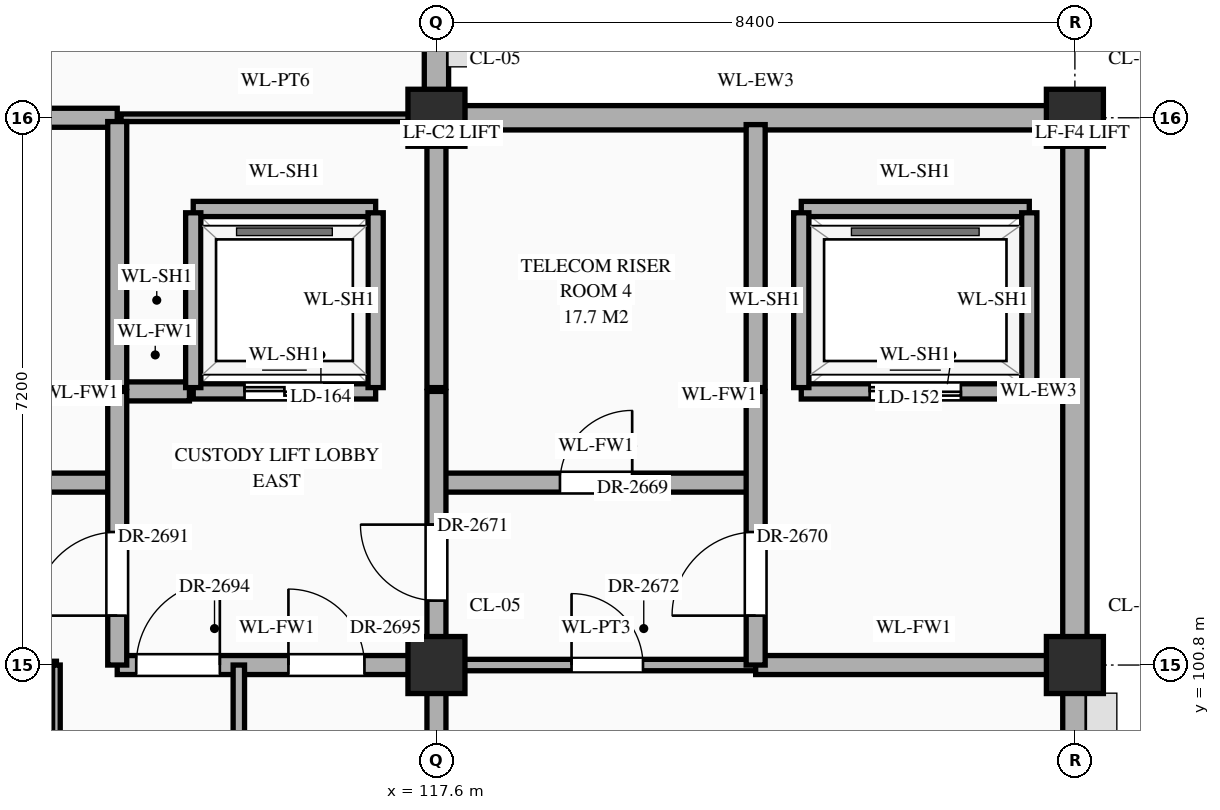
"""IFC4 building model, lengths in metres.
Left out: names, types, materials, properties, quantities, classifications, styles, units other than length and angle.
Written with IfcOpenShell. Run it as: python <this file> out.ifc"""

import sys

from ifc_helpers import new_model, si_unit, direction, frame, frame_2d, origin, origin_2d, place, context, subcontext, project, spatial, rectangle, extrude, element, fill, save


model = new_model("IFC4")
c1 = context("Model", 3, precision=1e-05, world=origin(), true_north=direction((0.0, 1.0)))
c2 = subcontext(c1, "Body", "Model", "MODEL_VIEW")
j1 = project(units=[si_unit("LENGTHUNIT", "METRE"), si_unit("PLANEANGLEUNIT", "RADIAN")], contexts=[c1])
p1 = place(None, origin())
s1 = spatial("IfcSite", under=j1, at=p1, CompositionType="ELEMENT")
p2 = place(p1, origin())
s2 = spatial("IfcBuilding", under=s1, at=p2, CompositionType="ELEMENT")
p3 = place(p2, frame((0.0, 0.0, 39.3)))
s3 = spatial("IfcBuildingStorey", under=s2, at=p3, CompositionType="ELEMENT", Elevation=39.3)
for number, where, z_axis, x_axis in (
    (1, (117.6, 100.8, 0.0), (0.0, 0.0, 1.0), (1.0, 0.0, 0.0)),
    (2, (117.6, 108.0, 0.0), (0.0, 0.0, 1.0), (1.0, 0.0, 0.0)),
    (3, (126.0, 100.8, 0.0), (0.0, 0.0, 1.0), (1.0, 0.0, 0.0)),
    (4, (126.0, 108.0, 0.0), (0.0, 0.0, 1.0), (1.0, 0.0, 0.0)),
):
    element("IfcColumn", number, at=place(p3, frame(where, z_axis=z_axis, x_axis=x_axis)), inside=s3, PredefinedType="COLUMN", context=c2, shape_type="SweptSolid", body=[
        extrude(rectangle(XDim=0.75, YDim=0.75, at=origin_2d()), origin(), (0.0, 0.0, 1.0), 4.2),
    ])
p4 = place(p3, frame((117.6, 108.37, 0.0), z_axis=(0.0, 0.0, 1.0), x_axis=(0.0, 1.0, 0.0)))
e5 = element("IfcWall", 5, at=p4, inside=s3, PredefinedType="STANDARD", context=c2, shape_type="SweptSolid", body=[
    extrude(rectangle(XDim=6.46, YDim=0.32, at=frame_2d((3.23, 0.0))), origin(), (0.0, 0.0, 1.0), 3.3),
])
p5 = place(p4, frame((3.93, 0.0, 0.85)))
e6 = element("IfcOpeningElement", 6, at=p5, cuts=e5, PredefinedType="OPENING", context=c2, shape_type="SweptSolid", body=[
    extrude(rectangle(XDim=1.2, YDim=1.56, at=frame_2d((0.6, 0.78))), frame((0.0, 0.172, 0.0), z_axis=(0.0, -1.0, 0.0), x_axis=(1.0, 0.0, 0.0)), (0.0, 0.0, 1.0), 0.344),
])
p6 = place(p3, frame((126.0, 93.97, 0.0), z_axis=(0.0, 0.0, 1.0), x_axis=(0.0, 1.0, 0.0)))
e7 = element("IfcWall", 7, at=p6, inside=s3, PredefinedType="STANDARD", context=c2, shape_type="SweptSolid", body=[
    extrude(rectangle(XDim=6.46, YDim=0.32, at=frame_2d((3.23, 0.0))), origin(), (0.0, 0.0, 1.0), 3.3),
])
p7 = place(p6, frame((3.93, 0.0, 0.85)))
e8 = element("IfcOpeningElement", 8, at=p7, cuts=e7, PredefinedType="OPENING", context=c2, shape_type="SweptSolid", body=[
    extrude(rectangle(XDim=1.2, YDim=1.38, at=frame_2d((0.6, 0.69))), frame((0.0, 0.172, 0.0), z_axis=(0.0, -1.0, 0.0), x_axis=(1.0, 0.0, 0.0)), (0.0, 0.0, 1.0), 0.344),
])
p8 = place(p3, frame((117.97, 108.0, 0.0), z_axis=(0.0, 0.0, 1.0), x_axis=(1.0, 0.0, 0.0)))
e9 = element("IfcWall", 9, at=p8, inside=s3, PredefinedType="STANDARD", context=c2, shape_type="SweptSolid", body=[
    extrude(rectangle(XDim=7.66, YDim=0.32, at=frame_2d((3.83, 0.0))), origin(), (0.0, 0.0, 1.0), 3.3),
])
p9 = place(p3, frame((126.0, 101.17, 0.0), z_axis=(0.0, 0.0, 1.0), x_axis=(0.0, 1.0, 0.0)))
e10 = element("IfcWall", 10, at=p9, inside=s3, PredefinedType="STANDARD", context=c2, shape_type="SweptSolid", body=[
    extrude(rectangle(XDim=6.46, YDim=0.32, at=frame_2d((3.23, 0.0))), origin(), (0.0, 0.0, 1.0), 3.3),
])
p10 = place(p3, frame((109.2, 100.8, 0.0), z_axis=(0.0, 0.0, 1.0), x_axis=(1.0, 0.0, 0.0)))
e11 = element("IfcWall", 11, at=p10, inside=s3, PredefinedType="STANDARD", context=c2, shape_type="SweptSolid", body=[
    extrude(rectangle(XDim=3.4, YDim=0.1, at=frame_2d((1.7, 0.0))), origin(), (0.0, 0.0, 1.0), 3.1),
])
p11 = place(p10, frame((1.317, 0.0, 0.0)))
e12 = element("IfcOpeningElement", 12, at=p11, cuts=e11, PredefinedType="OPENING", context=c2, shape_type="SweptSolid", body=[
    extrude(rectangle(XDim=1.06, YDim=2.4, at=frame_2d((0.53, 1.2))), frame((0.0, 0.062, 0.0), z_axis=(0.0, -1.0, 0.0), x_axis=(1.0, 0.0, 0.0)), (0.0, 0.0, 1.0), 0.124),
])
p12 = place(p3, frame((113.4, 100.8, 0.0), z_axis=(0.0, 0.0, 1.0), x_axis=(1.0, 0.0, 0.0)))
e13 = element("IfcWall", 13, at=p12, inside=s3, PredefinedType="STANDARD", context=c2, shape_type="SweptSolid", body=[
    extrude(rectangle(XDim=4.2, YDim=0.25, at=frame_2d((2.1, 0.0))), origin(), (0.0, 0.0, 1.0), 3.1),
])
p13 = place(p12, frame((0.25, 0.0, 0.0)))
e14 = element("IfcOpeningElement", 14, at=p13, cuts=e13, PredefinedType="OPENING", context=c2, shape_type="SweptSolid", body=[
    extrude(rectangle(XDim=1.1, YDim=2.2, at=frame_2d((0.55, 1.1))), frame((0.0, 0.137, 0.0), z_axis=(0.0, -1.0, 0.0), x_axis=(1.0, 0.0, 0.0)), (0.0, 0.0, 1.0), 0.274),
])
p14 = place(p12, frame((2.252, 0.0, 0.0)))
e15 = element("IfcOpeningElement", 15, at=p14, cuts=e13, PredefinedType="OPENING", context=c2, shape_type="SweptSolid", body=[
    extrude(rectangle(XDim=1.0, YDim=2.2, at=frame_2d((0.5, 1.1))), frame((0.0, 0.137, 0.0), z_axis=(0.0, -1.0, 0.0), x_axis=(1.0, 0.0, 0.0)), (0.0, 0.0, 1.0), 0.274),
])
p15 = place(p3, frame((117.6, 100.8, 0.0), z_axis=(0.0, 0.0, 1.0), x_axis=(1.0, 0.0, 0.0)))
e16 = element("IfcWall", 16, at=p15, inside=s3, PredefinedType="STANDARD", context=c2, shape_type="SweptSolid", body=[
    extrude(rectangle(XDim=4.2, YDim=0.15, at=frame_2d((2.1, 0.0))), origin(), (0.0, 0.0, 1.0), 3.1),
])
p16 = place(p15, frame((1.778, 0.0, 0.0)))
e17 = element("IfcOpeningElement", 17, at=p16, cuts=e16, PredefinedType="OPENING", context=c2, shape_type="SweptSolid", body=[
    extrude(rectangle(XDim=0.94, YDim=2.3, at=frame_2d((0.47, 1.15))), frame((0.0, 0.087, 0.0), z_axis=(0.0, -1.0, 0.0), x_axis=(1.0, 0.0, 0.0)), (0.0, 0.0, 1.0), 0.174),
])
p17 = place(p3, frame((121.8, 100.8, 0.0), z_axis=(0.0, 0.0, 1.0), x_axis=(1.0, 0.0, 0.0)))
e18 = element("IfcWall", 18, at=p17, inside=s3, PredefinedType="STANDARD", context=c2, shape_type="SweptSolid", body=[
    extrude(rectangle(XDim=4.16, YDim=0.25, at=frame_2d((2.08, 0.0))), origin(), (0.0, 0.0, 1.0), 3.1),
])
p18 = place(p3, frame((109.2, 103.2, 0.0), z_axis=(0.0, 0.0, 1.0), x_axis=(1.0, 0.0, 0.0)))
e19 = element("IfcWall", 19, at=p18, inside=s3, PredefinedType="STANDARD", context=c2, shape_type="SweptSolid", body=[
    extrude(rectangle(XDim=4.2, YDim=0.25, at=frame_2d((2.1, 0.0))), origin(), (0.0, 0.0, 1.0), 3.95),
])
p19 = place(p18, frame((1.625, 0.0, 0.0)))
e20 = element("IfcOpeningElement", 20, at=p19, cuts=e19, PredefinedType="OPENING", context=c2, shape_type="SweptSolid", body=[
    extrude(rectangle(XDim=0.95, YDim=2.15, at=frame_2d((0.475, 1.075))), frame((0.0, 0.137, 0.0), z_axis=(0.0, -1.0, 0.0), x_axis=(1.0, 0.0, 0.0)), (0.0, 0.0, 1.0), 0.274),
])
p20 = place(p3, frame((117.6, 103.2, 0.0), z_axis=(0.0, 0.0, 1.0), x_axis=(1.0, 0.0, 0.0)))
e21 = element("IfcWall", 21, at=p20, inside=s3, PredefinedType="STANDARD", context=c2, shape_type="SweptSolid", body=[
    extrude(rectangle(XDim=4.2, YDim=0.25, at=frame_2d((2.1, 0.0))), origin(), (0.0, 0.0, 1.0), 3.95),
])
p21 = place(p20, frame((1.625, 0.0, 0.0)))
e22 = element("IfcOpeningElement", 22, at=p21, cuts=e21, PredefinedType="OPENING", context=c2, shape_type="SweptSolid", body=[
    extrude(rectangle(XDim=0.95, YDim=2.15, at=frame_2d((0.475, 1.075))), frame((0.0, 0.137, 0.0), z_axis=(0.0, -1.0, 0.0), x_axis=(1.0, 0.0, 0.0)), (0.0, 0.0, 1.0), 0.274),
])
p22 = place(p3, frame((113.45, 104.4, 0.0), z_axis=(0.0, 0.0, 1.0), x_axis=(1.0, 0.0, 0.0)))
e23 = element("IfcWall", 23, at=p22, inside=s3, PredefinedType="STANDARD", context=c2, shape_type="SweptSolid", body=[
    extrude(rectangle(XDim=0.9, YDim=0.25, at=frame_2d((0.45, 0.0))), origin(), (0.0, 0.0, 1.0), 3.95),
])
p23 = place(p3, frame((114.4, 104.4, 0.0), z_axis=(0.0, 0.0, 1.0), x_axis=(1.0, 0.0, 0.0)))
e24 = element("IfcWall", 24, at=p23, inside=s3, PredefinedType="STANDARD", context=c2, shape_type="SweptSolid", body=[
    extrude(rectangle(XDim=2.4, YDim=0.2, at=frame_2d((1.2, 0.0))), origin(), (0.0, 0.0, 1.0), 3.95),
])
p24 = place(p23, frame((0.675, 0.0, 0.0)))
e25 = element("IfcOpeningElement", 25, at=p24, cuts=e24, PredefinedType="OPENING", context=c2, shape_type="SweptSolid", body=[
    extrude(rectangle(XDim=1.05, YDim=2.15, at=frame_2d((0.525, 1.075))), frame((0.0, 0.112, 0.0), z_axis=(0.0, -1.0, 0.0), x_axis=(1.0, 0.0, 0.0)), (0.0, 0.0, 1.0), 0.224),
])
p25 = place(p3, frame((122.4, 104.4, 0.0), z_axis=(0.0, 0.0, 1.0), x_axis=(1.0, 0.0, 0.0)))
e26 = element("IfcWall", 26, at=p25, inside=s3, PredefinedType="STANDARD", context=c2, shape_type="SweptSolid", body=[
    extrude(rectangle(XDim=3.0, YDim=0.2, at=frame_2d((1.5, 0.0))), origin(), (0.0, 0.0, 1.0), 3.95),
])
p26 = place(p25, frame((0.9, 0.0, 0.0)))
e27 = element("IfcOpeningElement", 27, at=p26, cuts=e26, PredefinedType="OPENING", context=c2, shape_type="SweptSolid", body=[
    extrude(rectangle(XDim=1.2, YDim=2.15, at=frame_2d((0.6, 1.075))), frame((0.0, 0.112, 0.0), z_axis=(0.0, -1.0, 0.0), x_axis=(1.0, 0.0, 0.0)), (0.0, 0.0, 1.0), 0.224),
])
p27 = place(p3, frame((114.4, 106.8, 0.0), z_axis=(0.0, 0.0, 1.0), x_axis=(1.0, 0.0, 0.0)))
e28 = element("IfcWall", 28, at=p27, inside=s3, PredefinedType="STANDARD", context=c2, shape_type="SweptSolid", body=[
    extrude(rectangle(XDim=2.4, YDim=0.2, at=frame_2d((1.2, 0.0))), origin(), (0.0, 0.0, 1.0), 3.95),
])
p28 = place(p3, frame((122.4, 106.8, 0.0), z_axis=(0.0, 0.0, 1.0), x_axis=(1.0, 0.0, 0.0)))
e29 = element("IfcWall", 29, at=p28, inside=s3, PredefinedType="STANDARD", context=c2, shape_type="SweptSolid", body=[
    extrude(rectangle(XDim=3.0, YDim=0.2, at=frame_2d((1.5, 0.0))), origin(), (0.0, 0.0, 1.0), 3.95),
])
p29 = place(p3, frame((109.2, 108.0, 0.0), z_axis=(0.0, 0.0, 1.0), x_axis=(1.0, 0.0, 0.0)))
e30 = element("IfcWall", 30, at=p29, inside=s3, PredefinedType="STANDARD", context=c2, shape_type="SweptSolid", body=[
    extrude(rectangle(XDim=4.2, YDim=0.25, at=frame_2d((2.1, 0.0))), origin(), (0.0, 0.0, 1.0), 3.1),
])
p30 = place(p29, frame((1.772, 0.0, 0.0)))
e31 = element("IfcOpeningElement", 31, at=p30, cuts=e30, PredefinedType="OPENING", context=c2, shape_type="SweptSolid", body=[
    extrude(rectangle(XDim=0.95, YDim=2.15, at=frame_2d((0.475, 1.075))), frame((0.0, 0.137, 0.0), z_axis=(0.0, -1.0, 0.0), x_axis=(1.0, 0.0, 0.0)), (0.0, 0.0, 1.0), 0.274),
])
p31 = place(p3, frame((113.45, 108.0, 0.0), z_axis=(0.0, 0.0, 1.0), x_axis=(1.0, 0.0, 0.0)))
e32 = element("IfcWall", 32, at=p31, inside=s3, PredefinedType="STANDARD", context=c2, shape_type="SweptSolid", body=[
    extrude(rectangle(XDim=4.06, YDim=0.1, at=frame_2d((2.03, 0.0))), origin(), (0.0, 0.0, 1.0), 3.1),
])
p32 = place(p3, frame((112.6, 96.0, 0.0), z_axis=(0.0, 0.0, 1.0), x_axis=(0.0, 1.0, 0.0)))
e33 = element("IfcWall", 33, at=p32, inside=s3, PredefinedType="STANDARD", context=c2, shape_type="SweptSolid", body=[
    extrude(rectangle(XDim=4.8, YDim=0.1, at=frame_2d((2.4, 0.0))), origin(), (0.0, 0.0, 1.0), 3.95),
])
p33 = place(p32, frame((1.88, 0.0, 0.0)))
e34 = element("IfcOpeningElement", 34, at=p33, cuts=e33, PredefinedType="OPENING", context=c2, shape_type="SweptSolid", body=[
    extrude(rectangle(XDim=1.04, YDim=2.2, at=frame_2d((0.52, 1.1))), frame((0.0, 0.062, 0.0), z_axis=(0.0, -1.0, 0.0), x_axis=(1.0, 0.0, 0.0)), (0.0, 0.0, 1.0), 0.124),
])
p34 = place(p3, frame((113.4, 100.8, 0.0), z_axis=(0.0, 0.0, 1.0), x_axis=(0.0, 1.0, 0.0)))
e35 = element("IfcWall", 35, at=p34, inside=s3, PredefinedType="STANDARD", context=c2, shape_type="SweptSolid", body=[
    extrude(rectangle(XDim=3.6, YDim=0.25, at=frame_2d((1.8, 0.0))), origin(), (0.0, 0.0, 1.0), 3.95),
])
p35 = place(p34, frame((0.65, 0.0, 0.0)))
e36 = element("IfcOpeningElement", 36, at=p35, cuts=e35, PredefinedType="OPENING", context=c2, shape_type="SweptSolid", body=[
    extrude(rectangle(XDim=1.1, YDim=2.2, at=frame_2d((0.55, 1.1))), frame((0.0, 0.137, 0.0), z_axis=(0.0, -1.0, 0.0), x_axis=(1.0, 0.0, 0.0)), (0.0, 0.0, 1.0), 0.274),
])
p36 = place(p3, frame((113.4, 104.45, 0.0), z_axis=(0.0, 0.0, 1.0), x_axis=(0.0, 1.0, 0.0)))
e37 = element("IfcWall", 37, at=p36, inside=s3, PredefinedType="STANDARD", context=c2, shape_type="SweptSolid", body=[
    extrude(rectangle(XDim=3.5, YDim=0.25, at=frame_2d((1.75, 0.0))), origin(), (0.0, 0.0, 1.0), 3.95),
])
p37 = place(p3, frame((114.4, 104.45, 0.0), z_axis=(0.0, 0.0, 1.0), x_axis=(0.0, 1.0, 0.0)))
e38 = element("IfcWall", 38, at=p37, inside=s3, PredefinedType="STANDARD", context=c2, shape_type="SweptSolid", body=[
    extrude(rectangle(XDim=2.3, YDim=0.2, at=frame_2d((1.15, 0.0))), origin(), (0.0, 0.0, 1.0), 3.95),
])
p38 = place(p3, frame((115.0, 96.0, 0.0), z_axis=(0.0, 0.0, 1.0), x_axis=(0.0, 1.0, 0.0)))
e39 = element("IfcWall", 39, at=p38, inside=s3, PredefinedType="STANDARD", context=c2, shape_type="SweptSolid", body=[
    extrude(rectangle(XDim=4.8, YDim=0.15, at=frame_2d((2.4, 0.0))), origin(), (0.0, 0.0, 1.0), 3.95),
])
p39 = place(p38, frame((1.86, 0.0, 0.0)))
e40 = element("IfcOpeningElement", 40, at=p39, cuts=e39, PredefinedType="OPENING", context=c2, shape_type="SweptSolid", body=[
    extrude(rectangle(XDim=1.08, YDim=2.25, at=frame_2d((0.54, 1.125))), frame((0.0, 0.087, 0.0), z_axis=(0.0, -1.0, 0.0), x_axis=(1.0, 0.0, 0.0)), (0.0, 0.0, 1.0), 0.174),
])
p40 = place(p3, frame((116.8, 104.45, 0.0), z_axis=(0.0, 0.0, 1.0), x_axis=(0.0, 1.0, 0.0)))
e41 = element("IfcWall", 41, at=p40, inside=s3, PredefinedType="STANDARD", context=c2, shape_type="SweptSolid", body=[
    extrude(rectangle(XDim=2.3, YDim=0.2, at=frame_2d((1.15, 0.0))), origin(), (0.0, 0.0, 1.0), 3.95),
])
p41 = place(p3, frame((117.6, 91.2, 0.0), z_axis=(0.0, 0.0, 1.0), x_axis=(0.0, 1.0, 0.0)))
e42 = element("IfcWall", 42, at=p41, inside=s3, PredefinedType="STANDARD", context=c2, shape_type="SweptSolid", body=[
    extrude(rectangle(XDim=13.2, YDim=0.25, at=frame_2d((6.6, 0.0))), origin(), (0.0, 0.0, 1.0), 3.2),
])
p42 = place(p41, frame((0.577, 0.0, 0.0)))
e43 = element("IfcOpeningElement", 43, at=p42, cuts=e42, PredefinedType="OPENING", context=c2, shape_type="SweptSolid", body=[
    extrude(rectangle(XDim=0.95, YDim=2.15, at=frame_2d((0.475, 1.075))), frame((0.0, 0.137, 0.0), z_axis=(0.0, -1.0, 0.0), x_axis=(1.0, 0.0, 0.0)), (0.0, 0.0, 1.0), 0.274),
])
p43 = place(p41, frame((10.448, 0.0, 0.0)))
e44 = element("IfcOpeningElement", 44, at=p43, cuts=e42, PredefinedType="OPENING", context=c2, shape_type="SweptSolid", body=[
    extrude(rectangle(XDim=1.0, YDim=2.2, at=frame_2d((0.5, 1.1))), frame((0.0, 0.137, 0.0), z_axis=(0.0, -1.0, 0.0), x_axis=(1.0, 0.0, 0.0)), (0.0, 0.0, 1.0), 0.274),
])
p44 = place(p41, frame((3.248, 0.0, 0.0)))
e45 = element("IfcOpeningElement", 45, at=p44, cuts=e42, PredefinedType="OPENING", context=c2, shape_type="SweptSolid", body=[
    extrude(rectangle(XDim=1.0, YDim=2.2, at=frame_2d((0.5, 1.1))), frame((0.0, 0.137, 0.0), z_axis=(0.0, -1.0, 0.0), x_axis=(1.0, 0.0, 0.0)), (0.0, 0.0, 1.0), 0.274),
])
p45 = place(p3, frame((117.6, 104.45, 0.0), z_axis=(0.0, 0.0, 1.0), x_axis=(0.0, 1.0, 0.0)))
e46 = element("IfcWall", 46, at=p45, inside=s3, PredefinedType="STANDARD", context=c2, shape_type="SweptSolid", body=[
    extrude(rectangle(XDim=3.46, YDim=0.25, at=frame_2d((1.73, 0.0))), origin(), (0.0, 0.0, 1.0), 3.2),
])
p46 = place(p3, frame((121.8, 100.8, 0.0), z_axis=(0.0, 0.0, 1.0), x_axis=(0.0, 1.0, 0.0)))
e47 = element("IfcWall", 47, at=p46, inside=s3, PredefinedType="STANDARD", context=c2, shape_type="SweptSolid", body=[
    extrude(rectangle(XDim=3.6, YDim=0.25, at=frame_2d((1.8, 0.0))), origin(), (0.0, 0.0, 1.0), 3.6),
])
p47 = place(p46, frame((0.65, 0.0, 0.0)))
e48 = element("IfcOpeningElement", 48, at=p47, cuts=e47, PredefinedType="OPENING", context=c2, shape_type="SweptSolid", body=[
    extrude(rectangle(XDim=1.1, YDim=2.2, at=frame_2d((0.55, 1.1))), frame((0.0, 0.137, 0.0), z_axis=(0.0, -1.0, 0.0), x_axis=(1.0, 0.0, 0.0)), (0.0, 0.0, 1.0), 0.274),
])
p48 = place(p3, frame((121.8, 104.45, 0.0), z_axis=(0.0, 0.0, 1.0), x_axis=(0.0, 1.0, 0.0)))
e49 = element("IfcWall", 49, at=p48, inside=s3, PredefinedType="STANDARD", context=c2, shape_type="SweptSolid", body=[
    extrude(rectangle(XDim=3.46, YDim=0.25, at=frame_2d((1.73, 0.0))), origin(), (0.0, 0.0, 1.0), 3.6),
])
for number, where, z_axis, x_axis in (
    (50, (122.4, 104.45, 0.0), (0.0, 0.0, 1.0), (0.0, 1.0, 0.0)),
    (51, (125.4, 104.45, 0.0), (0.0, 0.0, 1.0), (0.0, 1.0, 0.0)),
):
    element("IfcWall", number, at=place(p3, frame(where, z_axis=z_axis, x_axis=x_axis)), inside=s3, PredefinedType="STANDARD", context=c2, shape_type="SweptSolid", body=[
        extrude(rectangle(XDim=2.3, YDim=0.2, at=frame_2d((1.15, 0.0))), origin(), (0.0, 0.0, 1.0), 3.95),
    ])
p49 = place(p26, origin())
e52 = element("IfcDoor", 52, at=p49, inside=s3, OperationType="DOUBLE_DOOR_SLIDING", PredefinedType="DOOR", context=c2, shape_type="SweptSolid", body=[
    extrude(rectangle(XDim=1.2, YDim=2.15, at=frame_2d((0.6, 1.075))), frame((0.0, 0.025, 0.0), z_axis=(0.0, -1.0, 0.0), x_axis=(1.0, 0.0, 0.0)), (0.0, 0.0, 1.0), 0.05),
])
fill(e27, e52)
p50 = place(p24, origin())
e53 = element("IfcDoor", 53, at=p50, inside=s3, OperationType="DOUBLE_DOOR_SLIDING", PredefinedType="DOOR", context=c2, shape_type="SweptSolid", body=[
    extrude(rectangle(XDim=1.05, YDim=2.15, at=frame_2d((0.525, 1.075))), frame((0.0, 0.025, 0.0), z_axis=(0.0, -1.0, 0.0), x_axis=(1.0, 0.0, 0.0)), (0.0, 0.0, 1.0), 0.05),
])
fill(e25, e53)
p51 = place(p21, origin())
e54 = element("IfcDoor", 54, at=p51, inside=s3, OperationType="SINGLE_SWING_RIGHT", PredefinedType="DOOR", context=c2, shape_type="SweptSolid", body=[
    extrude(rectangle(XDim=0.95, YDim=2.15, at=frame_2d((0.475, 1.075))), frame((0.0, 0.025, 0.0), z_axis=(0.0, -1.0, 0.0), x_axis=(1.0, 0.0, 0.0)), (0.0, 0.0, 1.0), 0.05),
])
fill(e22, e54)
p52 = place(p47, origin())
e55 = element("IfcDoor", 55, at=p52, inside=s3, OperationType="SINGLE_SWING_LEFT", PredefinedType="DOOR", context=c2, shape_type="SweptSolid", body=[
    extrude(rectangle(XDim=1.1, YDim=2.2, at=frame_2d((0.55, 1.1))), frame((0.0, 0.025, 0.0), z_axis=(0.0, -1.0, 0.0), x_axis=(1.0, 0.0, 0.0)), (0.0, 0.0, 1.0), 0.05),
])
fill(e48, e55)
p53 = place(p43, origin())
e56 = element("IfcDoor", 56, at=p53, inside=s3, OperationType="SINGLE_SWING_RIGHT", PredefinedType="DOOR", context=c2, shape_type="SweptSolid", body=[
    extrude(rectangle(XDim=1.0, YDim=2.2, at=frame_2d((0.5, 1.1))), frame((0.0, 0.025, 0.0), z_axis=(0.0, -1.0, 0.0), x_axis=(1.0, 0.0, 0.0)), (0.0, 0.0, 1.0), 0.05),
])
fill(e44, e56)
p54 = place(p16, origin())
e57 = element("IfcDoor", 57, at=p54, inside=s3, OperationType="SINGLE_SWING_LEFT", PredefinedType="DOOR", context=c2, shape_type="SweptSolid", body=[
    extrude(rectangle(XDim=0.94, YDim=2.3, at=frame_2d((0.47, 1.15))), frame((0.0, 0.025, 0.0), z_axis=(0.0, -1.0, 0.0), x_axis=(1.0, 0.0, 0.0)), (0.0, 0.0, 1.0), 0.05),
])
fill(e17, e57)
p55 = place(p35, origin())
e58 = element("IfcDoor", 58, at=p55, inside=s3, OperationType="SINGLE_SWING_LEFT", PredefinedType="DOOR", context=c2, shape_type="SweptSolid", body=[
    extrude(rectangle(XDim=1.1, YDim=2.2, at=frame_2d((0.55, 1.1))), frame((0.0, 0.025, 0.0), z_axis=(0.0, -1.0, 0.0), x_axis=(1.0, 0.0, 0.0)), (0.0, 0.0, 1.0), 0.05),
])
fill(e36, e58)
p56 = place(p13, origin())
e59 = element("IfcDoor", 59, at=p56, inside=s3, OperationType="SINGLE_SWING_RIGHT", PredefinedType="DOOR", context=c2, shape_type="SweptSolid", body=[
    extrude(rectangle(XDim=1.1, YDim=2.2, at=frame_2d((0.55, 1.1))), frame((0.0, 0.025, 0.0), z_axis=(0.0, -1.0, 0.0), x_axis=(1.0, 0.0, 0.0)), (0.0, 0.0, 1.0), 0.05),
])
fill(e14, e59)
p57 = place(p14, origin())
e60 = element("IfcDoor", 60, at=p57, inside=s3, OperationType="SINGLE_SWING_LEFT", PredefinedType="DOOR", context=c2, shape_type="SweptSolid", body=[
    extrude(rectangle(XDim=1.0, YDim=2.2, at=frame_2d((0.5, 1.1))), frame((0.0, 0.025, 0.0), z_axis=(0.0, -1.0, 0.0), x_axis=(1.0, 0.0, 0.0)), (0.0, 0.0, 1.0), 0.05),
])
fill(e15, e60)
save(model, sys.argv[1])
